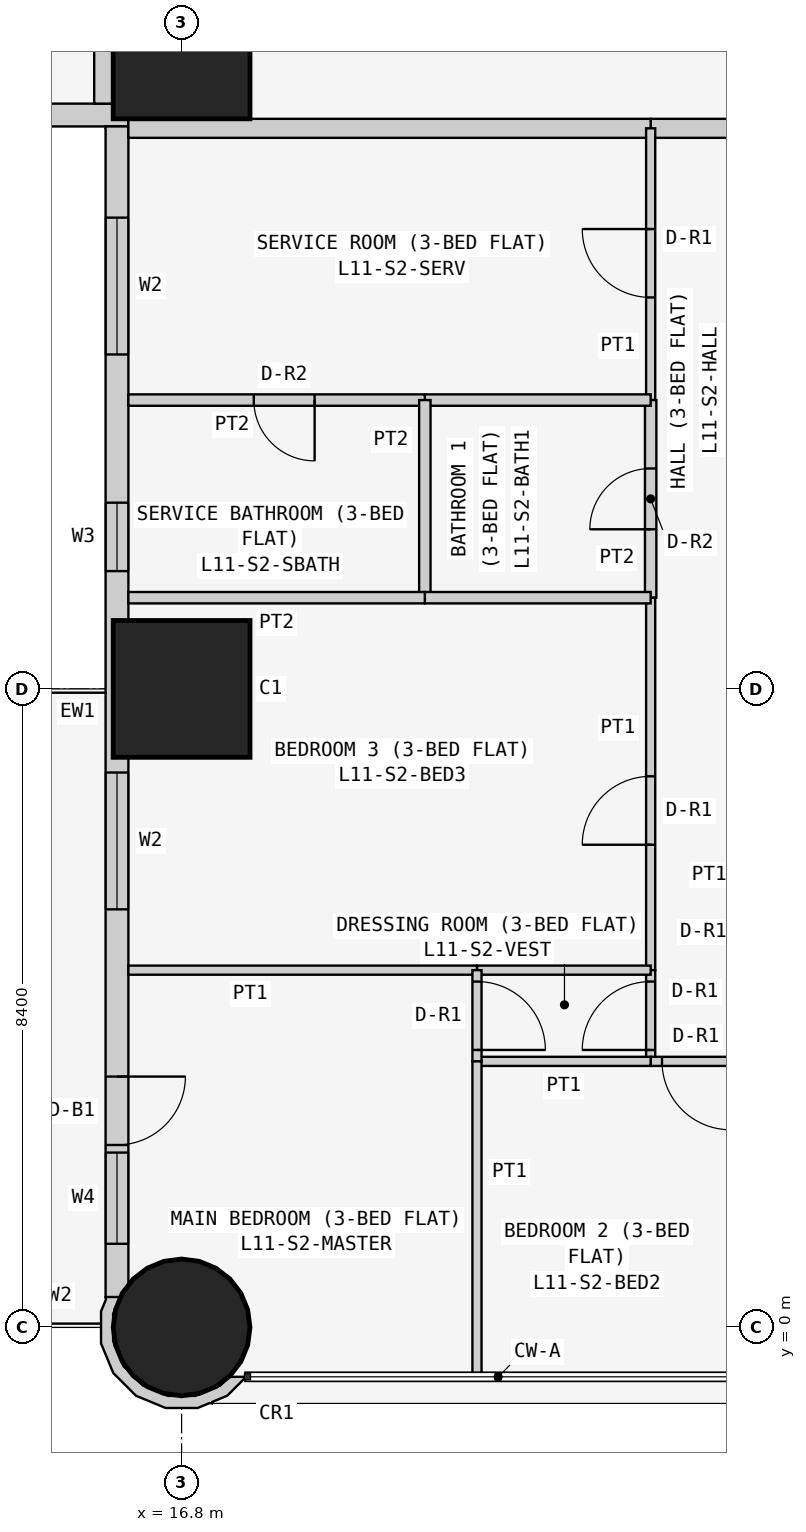
"""IFC4 building model, lengths in metres.
Left out: names, types, materials, properties, quantities, classifications, styles, units other than length and angle.
Written with IfcOpenShell. Run it as: python <this file> out.ifc"""

import sys

from ifc_helpers import new_model, si_unit, direction, frame, frame_2d, origin, origin_2d, place, context, subcontext, project, spatial, polyline, rectangle, circle, outline, extrude, element, fill, save


model = new_model("IFC4")
c1 = context("Model", 3, precision=1e-05, world=origin(), true_north=direction((0.0, 1.0)))
c2 = subcontext(c1, "Body", "Model", "MODEL_VIEW")
j1 = project(units=[si_unit("LENGTHUNIT", "METRE"), si_unit("PLANEANGLEUNIT", "RADIAN")], contexts=[c1])
p1 = place(None, origin())
s1 = spatial("IfcSite", under=j1, at=p1, CompositionType="ELEMENT")
p2 = place(p1, origin())
s2 = spatial("IfcBuilding", under=s1, at=p2, CompositionType="ELEMENT")
p3 = place(p2, frame((0.0, 0.0, 48.9)))
s3 = spatial("IfcBuildingStorey", under=s2, at=p3, CompositionType="ELEMENT", Elevation=48.9)
p4 = place(p3, frame((16.8, 0.0, 0.0), z_axis=(0.0, 0.0, 1.0), x_axis=(1.0, 0.0, 0.0)))
e1 = element("IfcColumn", 1, at=p4, inside=s3, PredefinedType="COLUMN", context=c2, shape_type="SweptSolid", body=[
    extrude(circle(Radius=0.9, at=origin_2d()), origin(), (0.0, 0.0, 1.0), 3.6),
])
for number, where, z_axis, x_axis in (
    (2, (16.8, 8.4, 0.0), (0.0, 0.0, 1.0), (1.0, 0.0, 0.0)),
    (3, (16.8, 16.8, 0.0), (0.0, 0.0, 1.0), (1.0, 0.0, 0.0)),
):
    element("IfcColumn", number, at=place(p3, frame(where, z_axis=z_axis, x_axis=x_axis)), inside=s3, PredefinedType="COLUMN", context=c2, shape_type="SweptSolid", body=[
        extrude(rectangle(XDim=1.8, YDim=1.8, at=origin_2d()), origin(), (0.0, 0.0, 1.0), 3.6),
    ])
p5 = place(p3, frame((0.4, 15.95, 0.0), z_axis=(0.0, 0.0, 1.0), x_axis=(1.0, 0.0, 0.0)))
e4 = element("IfcWall", 4, at=p5, inside=s3, PredefinedType="SOLIDWALL", context=c2, shape_type="SweptSolid", body=[
    extrude(rectangle(XDim=15.7, YDim=0.3, at=frame_2d((7.85, 0.0))), origin(), (0.0, 0.0, 1.0), 3.45),
])
p6 = place(p5, frame((12.4, 0.0, 0.9)))
e5 = element("IfcOpeningElement", 5, at=p6, cuts=e4, PredefinedType="OPENING", context=c2, shape_type="SweptSolid", body=[
    extrude(rectangle(XDim=1.8, YDim=1.5, at=frame_2d((0.9, 0.75))), frame((0.0, 0.16, 0.0), z_axis=(0.0, -1.0, 0.0), x_axis=(1.0, 0.0, 0.0)), (0.0, 0.0, 1.0), 0.32),
])
p7 = place(p5, frame((9.55, 0.0, 1.5)))
e6 = element("IfcOpeningElement", 6, at=p7, cuts=e4, PredefinedType="OPENING", context=c2, shape_type="SweptSolid", body=[
    extrude(rectangle(XDim=0.9, YDim=0.7, at=frame_2d((0.45, 0.35))), frame((0.0, 0.16, 0.0), z_axis=(0.0, -1.0, 0.0), x_axis=(1.0, 0.0, 0.0)), (0.0, 0.0, 1.0), 0.32),
])
p8 = place(p5, frame((5.1, 0.0, 0.9)))
e7 = element("IfcOpeningElement", 7, at=p8, cuts=e4, PredefinedType="OPENING", context=c2, shape_type="SweptSolid", body=[
    extrude(rectangle(XDim=1.8, YDim=1.5, at=frame_2d((0.9, 0.75))), frame((0.0, 0.16, 0.0), z_axis=(0.0, -1.0, 0.0), x_axis=(1.0, 0.0, 0.0)), (0.0, 0.0, 1.0), 0.32),
])
p9 = place(p5, frame((2.0, 0.0, 0.0)))
e8 = element("IfcOpeningElement", 8, at=p9, cuts=e4, PredefinedType="OPENING", context=c2, shape_type="SweptSolid", body=[
    extrude(rectangle(XDim=0.9, YDim=2.4, at=frame_2d((0.45, 1.2))), frame((0.0, 0.16, 0.0), z_axis=(0.0, -1.0, 0.0), x_axis=(1.0, 0.0, 0.0)), (0.0, 0.0, 1.0), 0.32),
])
p10 = place(p5, frame((0.7, 0.0, 0.9)))
e9 = element("IfcOpeningElement", 9, at=p10, cuts=e4, PredefinedType="OPENING", context=c2, shape_type="SweptSolid", body=[
    extrude(rectangle(XDim=1.2, YDim=1.5, at=frame_2d((0.6, 0.75))), frame((0.0, 0.16, 0.0), z_axis=(0.0, -1.0, 0.0), x_axis=(1.0, 0.0, 0.0)), (0.0, 0.0, 1.0), 0.32),
])
p11 = place(p3, frame((15.95, 15.8, 0.0), z_axis=(0.0, 0.0, 1.0), x_axis=(0.0, -1.0, 0.0)))
e10 = element("IfcWall", 10, at=p11, inside=s3, PredefinedType="SOLIDWALL", context=c2, shape_type="SweptSolid", body=[
    extrude(rectangle(XDim=15.4, YDim=0.3, at=frame_2d((7.7, 0.0))), origin(), (0.0, 0.0, 1.0), 3.45),
])
p12 = place(p11, frame((1.2, 0.0, 0.9)))
e11 = element("IfcOpeningElement", 11, at=p12, cuts=e10, PredefinedType="OPENING", context=c2, shape_type="SweptSolid", body=[
    extrude(rectangle(XDim=1.8, YDim=1.5, at=frame_2d((0.9, 0.75))), frame((0.0, 0.16, 0.0), z_axis=(0.0, -1.0, 0.0), x_axis=(1.0, 0.0, 0.0)), (0.0, 0.0, 1.0), 0.32),
])
p13 = place(p11, frame((4.95, 0.0, 1.5)))
e12 = element("IfcOpeningElement", 12, at=p13, cuts=e10, PredefinedType="OPENING", context=c2, shape_type="SweptSolid", body=[
    extrude(rectangle(XDim=0.9, YDim=0.7, at=frame_2d((0.45, 0.35))), frame((0.0, 0.16, 0.0), z_axis=(0.0, -1.0, 0.0), x_axis=(1.0, 0.0, 0.0)), (0.0, 0.0, 1.0), 0.32),
])
p14 = place(p11, frame((8.5, 0.0, 0.9)))
e13 = element("IfcOpeningElement", 13, at=p14, cuts=e10, PredefinedType="OPENING", context=c2, shape_type="SweptSolid", body=[
    extrude(rectangle(XDim=1.8, YDim=1.5, at=frame_2d((0.9, 0.75))), frame((0.0, 0.16, 0.0), z_axis=(0.0, -1.0, 0.0), x_axis=(1.0, 0.0, 0.0)), (0.0, 0.0, 1.0), 0.32),
])
p15 = place(p11, frame((12.5, 0.0, 0.0)))
e14 = element("IfcOpeningElement", 14, at=p15, cuts=e10, PredefinedType="OPENING", context=c2, shape_type="SweptSolid", body=[
    extrude(rectangle(XDim=0.9, YDim=2.4, at=frame_2d((0.45, 1.2))), frame((0.0, 0.16, 0.0), z_axis=(0.0, -1.0, 0.0), x_axis=(1.0, 0.0, 0.0)), (0.0, 0.0, 1.0), 0.32),
])
p16 = place(p11, frame((13.5, 0.0, 0.9)))
e15 = element("IfcOpeningElement", 15, at=p16, cuts=e10, PredefinedType="OPENING", context=c2, shape_type="SweptSolid", body=[
    extrude(rectangle(XDim=1.2, YDim=1.5, at=frame_2d((0.6, 0.75))), frame((0.0, 0.16, 0.0), z_axis=(0.0, -1.0, 0.0), x_axis=(1.0, 0.0, 0.0)), (0.0, 0.0, 1.0), 0.32),
])
p17 = place(p3, frame((15.89, 0.364, 0.0), z_axis=(0.0, 0.0, 1.0), x_axis=(-0.377204953059, -0.926129809145, 0.0)))
e16 = element("IfcWall", 16, at=p17, inside=s3, PredefinedType="SOLIDWALL", context=c2, shape_type="SweptSolid", body=[
    extrude(outline(polyline([(0.36, 1.803), (0.509, 1.741), (0.761, 1.486), (0.896, 1.154), (0.894, 0.795), (0.755, 0.465), (0.5, 0.213), (0.168, 0.078), (-0.1, 0.08), (0.001, -0.097), (0.03, -0.08), (0.199, -0.081), (0.589, 0.078), (0.889, 0.374), (1.053, 0.763), (1.055, 1.185), (0.896, 1.575), (0.778, 1.695), (0.769, 1.728), (0.75, 1.723), (0.6, 1.875), (0.295, 2.004), (0.281, 1.998), (0.36, 1.803)])), origin(), (0.0, 0.0, 1.0), 3.45),
])
p18 = place(p3, frame((24.171, 15.775, 0.0), z_axis=(0.0, 0.0, 1.0), x_axis=(-1.0, 0.0, 0.0)))
e17 = element("IfcWall", 17, at=p18, inside=s3, PredefinedType="PARTITIONING", context=c2, shape_type="SweptSolid", body=[
    extrude(rectangle(XDim=1.2, YDim=0.25, at=frame_2d((0.6, 0.0))), origin(), (0.0, 0.0, 1.0), 3.45),
])
for number, where, z_axis, x_axis in (
    (18, (22.971, 15.775, 0.0), (0.0, 0.0, 1.0), (-1.0, 0.0, 0.0)),
    (19, (15.775, 16.1, 0.0), (0.0, 0.0, 1.0), (0.0, 1.0, 0.0)),
):
    element("IfcWall", number, at=place(p3, frame(where, z_axis=z_axis, x_axis=x_axis)), inside=s3, PredefinedType="PARTITIONING", context=c2, shape_type="SweptSolid", body=[
        extrude(rectangle(XDim=6.871, YDim=0.25, at=frame_2d((3.436, 0.0))), origin(), (0.0, 0.0, 1.0), 3.45),
    ])
p19 = place(p3, frame((22.971, 12.2, 0.0), z_axis=(0.0, 0.0, 1.0), x_axis=(0.0, 1.0, 0.0)))
e20 = element("IfcWall", 20, at=p19, inside=s3, PredefinedType="PARTITIONING", context=c2, shape_type="SweptSolid", body=[
    extrude(rectangle(XDim=3.575, YDim=0.12, at=frame_2d((1.788, 0.0))), origin(), (0.0, 0.0, 1.0), 3.45),
])
p20 = place(p19, frame((1.35, 0.0, 0.0)))
e21 = element("IfcOpeningElement", 21, at=p20, cuts=e20, PredefinedType="OPENING", context=c2, shape_type="SweptSolid", body=[
    extrude(rectangle(XDim=0.9, YDim=2.1, at=frame_2d((0.45, 1.05))), frame((0.0, 0.07, 0.0), z_axis=(0.0, -1.0, 0.0), x_axis=(1.0, 0.0, 0.0)), (0.0, 0.0, 1.0), 0.14),
])
p21 = place(p3, frame((22.971, 9.6, 0.0), z_axis=(0.0, 0.0, 1.0), x_axis=(0.0, 1.0, 0.0)))
e22 = element("IfcWall", 22, at=p21, inside=s3, PredefinedType="PARTITIONING", context=c2, shape_type="SweptSolid", body=[
    extrude(rectangle(XDim=2.6, YDim=0.15, at=frame_2d((1.3, 0.0))), origin(), (0.0, 0.0, 1.0), 3.45),
])
p22 = place(p21, frame((0.9, 0.0, 0.0)))
e23 = element("IfcOpeningElement", 23, at=p22, cuts=e22, PredefinedType="OPENING", context=c2, shape_type="SweptSolid", body=[
    extrude(rectangle(XDim=0.8, YDim=2.1, at=frame_2d((0.4, 1.05))), frame((0.0, 0.085, 0.0), z_axis=(0.0, -1.0, 0.0), x_axis=(1.0, 0.0, 0.0)), (0.0, 0.0, 1.0), 0.17),
])
p23 = place(p3, frame((22.971, 4.7, 0.0), z_axis=(0.0, 0.0, 1.0), x_axis=(0.0, 1.0, 0.0)))
e24 = element("IfcWall", 24, at=p23, inside=s3, PredefinedType="PARTITIONING", context=c2, shape_type="SweptSolid", body=[
    extrude(rectangle(XDim=4.9, YDim=0.12, at=frame_2d((2.45, 0.0))), origin(), (0.0, 0.0, 1.0), 3.45),
])
p24 = place(p23, frame((1.65, 0.0, 0.0)))
e25 = element("IfcOpeningElement", 25, at=p24, cuts=e24, PredefinedType="OPENING", context=c2, shape_type="SweptSolid", body=[
    extrude(rectangle(XDim=0.9, YDim=2.1, at=frame_2d((0.45, 1.05))), frame((0.0, 0.07, 0.0), z_axis=(0.0, -1.0, 0.0), x_axis=(1.0, 0.0, 0.0)), (0.0, 0.0, 1.0), 0.14),
])
p25 = place(p3, frame((22.971, 3.5, 0.0), z_axis=(0.0, 0.0, 1.0), x_axis=(0.0, 1.0, 0.0)))
e26 = element("IfcWall", 26, at=p25, inside=s3, PredefinedType="PARTITIONING", context=c2, shape_type="SweptSolid", body=[
    extrude(rectangle(XDim=1.2, YDim=0.12, at=frame_2d((0.6, 0.0))), origin(), (0.0, 0.0, 1.0), 3.45),
])
p26 = place(p25, frame((0.15, 0.0, 0.0)))
e27 = element("IfcOpeningElement", 27, at=p26, cuts=e26, PredefinedType="OPENING", context=c2, shape_type="SweptSolid", body=[
    extrude(rectangle(XDim=0.9, YDim=2.1, at=frame_2d((0.45, 1.05))), frame((0.0, 0.07, 0.0), z_axis=(0.0, -1.0, 0.0), x_axis=(1.0, 0.0, 0.0)), (0.0, 0.0, 1.0), 0.14),
])
p27 = place(p3, frame((24.171, 3.5, 0.0), z_axis=(0.0, 0.0, 1.0), x_axis=(-1.0, 0.0, 0.0)))
e28 = element("IfcWall", 28, at=p27, inside=s3, PredefinedType="PARTITIONING", context=c2, shape_type="SweptSolid", body=[
    extrude(rectangle(XDim=1.2, YDim=0.12, at=frame_2d((0.6, 0.0))), origin(), (0.0, 0.0, 1.0), 3.45),
])
p28 = place(p27, frame((0.151, 0.0, 0.0)))
e29 = element("IfcOpeningElement", 29, at=p28, cuts=e28, PredefinedType="OPENING", context=c2, shape_type="SweptSolid", body=[
    extrude(rectangle(XDim=0.9, YDim=2.1, at=frame_2d((0.45, 1.05))), frame((0.0, 0.07, 0.0), z_axis=(0.0, -1.0, 0.0), x_axis=(1.0, 0.0, 0.0)), (0.0, 0.0, 1.0), 0.14),
])
p29 = place(p3, frame((22.971, 12.2, 0.0), z_axis=(0.0, 0.0, 1.0), x_axis=(-1.0, 0.0, 0.0)))
e30 = element("IfcWall", 30, at=p29, inside=s3, PredefinedType="PARTITIONING", context=c2, shape_type="SweptSolid", body=[
    extrude(rectangle(XDim=2.971, YDim=0.15, at=frame_2d((1.485, 0.0))), origin(), (0.0, 0.0, 1.0), 3.45),
])
p30 = place(p3, frame((20.0, 12.2, 0.0), z_axis=(0.0, 0.0, 1.0), x_axis=(-1.0, 0.0, 0.0)))
e31 = element("IfcWall", 31, at=p30, inside=s3, PredefinedType="PARTITIONING", context=c2, shape_type="SweptSolid", body=[
    extrude(rectangle(XDim=3.9, YDim=0.15, at=frame_2d((1.95, 0.0))), origin(), (0.0, 0.0, 1.0), 3.45),
])
p31 = place(p30, frame((1.45, 0.0, 0.0)))
e32 = element("IfcOpeningElement", 32, at=p31, cuts=e31, PredefinedType="OPENING", context=c2, shape_type="SweptSolid", body=[
    extrude(rectangle(XDim=0.8, YDim=2.1, at=frame_2d((0.4, 1.05))), frame((0.0, 0.085, 0.0), z_axis=(0.0, -1.0, 0.0), x_axis=(1.0, 0.0, 0.0)), (0.0, 0.0, 1.0), 0.17),
])
p32 = place(p3, frame((20.0, 9.6, 0.0), z_axis=(0.0, 0.0, 1.0), x_axis=(0.0, 1.0, 0.0)))
e33 = element("IfcWall", 33, at=p32, inside=s3, PredefinedType="PARTITIONING", context=c2, shape_type="SweptSolid", body=[
    extrude(rectangle(XDim=2.6, YDim=0.15, at=frame_2d((1.3, 0.0))), origin(), (0.0, 0.0, 1.0), 3.45),
])
p33 = place(p3, frame((22.971, 9.6, 0.0), z_axis=(0.0, 0.0, 1.0), x_axis=(-1.0, 0.0, 0.0)))
e34 = element("IfcWall", 34, at=p33, inside=s3, PredefinedType="PARTITIONING", context=c2, shape_type="SweptSolid", body=[
    extrude(rectangle(XDim=2.971, YDim=0.15, at=frame_2d((1.485, 0.0))), origin(), (0.0, 0.0, 1.0), 3.45),
])
p34 = place(p3, frame((20.0, 9.6, 0.0), z_axis=(0.0, 0.0, 1.0), x_axis=(-1.0, 0.0, 0.0)))
e35 = element("IfcWall", 35, at=p34, inside=s3, PredefinedType="PARTITIONING", context=c2, shape_type="SweptSolid", body=[
    extrude(rectangle(XDim=3.9, YDim=0.15, at=frame_2d((1.95, 0.0))), origin(), (0.0, 0.0, 1.0), 3.45),
])
p35 = place(p3, frame((22.971, 4.7, 0.0), z_axis=(0.0, 0.0, 1.0), x_axis=(-1.0, 0.0, 0.0)))
e36 = element("IfcWall", 36, at=p35, inside=s3, PredefinedType="PARTITIONING", context=c2, shape_type="SweptSolid", body=[
    extrude(rectangle(XDim=2.285, YDim=0.12, at=frame_2d((1.143, 0.0))), origin(), (0.0, 0.0, 1.0), 3.45),
])
p36 = place(p3, frame((20.686, 4.7, 0.0), z_axis=(0.0, 0.0, 1.0), x_axis=(-1.0, 0.0, 0.0)))
e37 = element("IfcWall", 37, at=p36, inside=s3, PredefinedType="PARTITIONING", context=c2, shape_type="SweptSolid", body=[
    extrude(rectangle(XDim=4.586, YDim=0.12, at=frame_2d((2.293, 0.0))), origin(), (0.0, 0.0, 1.0), 3.45),
])
p37 = place(p3, frame((22.971, 3.5, 0.0), z_axis=(0.0, 0.0, 1.0), x_axis=(-1.0, 0.0, 0.0)))
e38 = element("IfcWall", 38, at=p37, inside=s3, PredefinedType="PARTITIONING", context=c2, shape_type="SweptSolid", body=[
    extrude(rectangle(XDim=2.285, YDim=0.12, at=frame_2d((1.143, 0.0))), origin(), (0.0, 0.0, 1.0), 3.45),
])
p38 = place(p3, frame((20.686, 3.5, 0.0), z_axis=(0.0, 0.0, 1.0), x_axis=(0.0, 1.0, 0.0)))
e39 = element("IfcWall", 39, at=p38, inside=s3, PredefinedType="PARTITIONING", context=c2, shape_type="SweptSolid", body=[
    extrude(rectangle(XDim=1.2, YDim=0.12, at=frame_2d((0.6, 0.0))), origin(), (0.0, 0.0, 1.0), 3.45),
])
p39 = place(p38, frame((0.15, 0.0, 0.0)))
e40 = element("IfcOpeningElement", 40, at=p39, cuts=e39, PredefinedType="OPENING", context=c2, shape_type="SweptSolid", body=[
    extrude(rectangle(XDim=0.9, YDim=2.1, at=frame_2d((0.45, 1.05))), frame((0.0, 0.07, 0.0), z_axis=(0.0, -1.0, 0.0), x_axis=(1.0, 0.0, 0.0)), (0.0, 0.0, 1.0), 0.14),
])
p40 = place(p3, frame((20.686, -0.65, 0.0), z_axis=(0.0, 0.0, 1.0), x_axis=(0.0, 1.0, 0.0)))
e41 = element("IfcWall", 41, at=p40, inside=s3, PredefinedType="PARTITIONING", context=c2, shape_type="SweptSolid", body=[
    extrude(rectangle(XDim=4.15, YDim=0.12, at=frame_2d((2.075, 0.0))), origin(), (0.0, 0.0, 1.0), 3.45),
])
p41 = place(p12, origin())
e42 = element("IfcWindow", 42, at=p41, inside=s3, PartitioningType="SINGLE_PANEL", PredefinedType="WINDOW", context=c2, shape_type="SweptSolid", body=[
    extrude(rectangle(XDim=1.8, YDim=1.5, at=frame_2d((0.9, 0.75))), frame((0.0, 0.03, 0.0), z_axis=(0.0, -1.0, 0.0), x_axis=(1.0, 0.0, 0.0)), (0.0, 0.0, 1.0), 0.06),
])
fill(e11, e42)
p42 = place(p13, origin())
e43 = element("IfcWindow", 43, at=p42, inside=s3, PartitioningType="SINGLE_PANEL", PredefinedType="WINDOW", context=c2, shape_type="SweptSolid", body=[
    extrude(rectangle(XDim=0.9, YDim=0.7, at=frame_2d((0.45, 0.35))), frame((0.0, 0.03, 0.0), z_axis=(0.0, -1.0, 0.0), x_axis=(1.0, 0.0, 0.0)), (0.0, 0.0, 1.0), 0.06),
])
fill(e12, e43)
p43 = place(p14, origin())
e44 = element("IfcWindow", 44, at=p43, inside=s3, PartitioningType="SINGLE_PANEL", PredefinedType="WINDOW", context=c2, shape_type="SweptSolid", body=[
    extrude(rectangle(XDim=1.8, YDim=1.5, at=frame_2d((0.9, 0.75))), frame((0.0, 0.03, 0.0), z_axis=(0.0, -1.0, 0.0), x_axis=(1.0, 0.0, 0.0)), (0.0, 0.0, 1.0), 0.06),
])
fill(e13, e44)
p44 = place(p15, origin())
e45 = element("IfcDoor", 45, at=p44, inside=s3, OperationType="SINGLE_SWING_LEFT", PredefinedType="DOOR", context=c2, shape_type="SweptSolid", body=[
    extrude(rectangle(XDim=0.9, YDim=2.4, at=frame_2d((0.45, 1.2))), frame((0.0, 0.025, 0.0), z_axis=(0.0, -1.0, 0.0), x_axis=(1.0, 0.0, 0.0)), (0.0, 0.0, 1.0), 0.05),
])
fill(e14, e45)
p45 = place(p16, origin())
e46 = element("IfcWindow", 46, at=p45, inside=s3, PartitioningType="SINGLE_PANEL", PredefinedType="WINDOW", context=c2, shape_type="SweptSolid", body=[
    extrude(rectangle(XDim=1.2, YDim=1.5, at=frame_2d((0.6, 0.75))), frame((0.0, 0.03, 0.0), z_axis=(0.0, -1.0, 0.0), x_axis=(1.0, 0.0, 0.0)), (0.0, 0.0, 1.0), 0.06),
])
fill(e15, e46)
p46 = place(p20, origin())
e47 = element("IfcDoor", 47, at=p46, inside=s3, OperationType="SINGLE_SWING_RIGHT", PredefinedType="DOOR", context=c2, shape_type="SweptSolid", body=[
    extrude(rectangle(XDim=0.9, YDim=2.1, at=frame_2d((0.45, 1.05))), frame((0.0, 0.025, 0.0), z_axis=(0.0, -1.0, 0.0), x_axis=(1.0, 0.0, 0.0)), (0.0, 0.0, 1.0), 0.05),
])
fill(e21, e47)
p47 = place(p31, origin())
e48 = element("IfcDoor", 48, at=p47, inside=s3, OperationType="SINGLE_SWING_LEFT", PredefinedType="DOOR", context=c2, shape_type="SweptSolid", body=[
    extrude(rectangle(XDim=0.8, YDim=2.1, at=frame_2d((0.4, 1.05))), frame((0.0, 0.025, 0.0), z_axis=(0.0, -1.0, 0.0), x_axis=(1.0, 0.0, 0.0)), (0.0, 0.0, 1.0), 0.05),
])
fill(e32, e48)
p48 = place(p22, origin())
e49 = element("IfcDoor", 49, at=p48, inside=s3, OperationType="SINGLE_SWING_LEFT", PredefinedType="DOOR", context=c2, shape_type="SweptSolid", body=[
    extrude(rectangle(XDim=0.8, YDim=2.1, at=frame_2d((0.4, 1.05))), frame((0.0, 0.025, 0.0), z_axis=(0.0, -1.0, 0.0), x_axis=(1.0, 0.0, 0.0)), (0.0, 0.0, 1.0), 0.05),
])
fill(e23, e49)
p49 = place(p24, origin())
e50 = element("IfcDoor", 50, at=p49, inside=s3, OperationType="SINGLE_SWING_LEFT", PredefinedType="DOOR", context=c2, shape_type="SweptSolid", body=[
    extrude(rectangle(XDim=0.9, YDim=2.1, at=frame_2d((0.45, 1.05))), frame((0.0, 0.025, 0.0), z_axis=(0.0, -1.0, 0.0), x_axis=(1.0, 0.0, 0.0)), (0.0, 0.0, 1.0), 0.05),
])
fill(e25, e50)
p50 = place(p26, origin())
e51 = element("IfcDoor", 51, at=p50, inside=s3, OperationType="SINGLE_SWING_LEFT", PredefinedType="DOOR", context=c2, shape_type="SweptSolid", body=[
    extrude(rectangle(XDim=0.9, YDim=2.1, at=frame_2d((0.45, 1.05))), frame((0.0, 0.025, 0.0), z_axis=(0.0, -1.0, 0.0), x_axis=(1.0, 0.0, 0.0)), (0.0, 0.0, 1.0), 0.05),
])
fill(e27, e51)
p51 = place(p39, frame((0.9, 0.0, 0.0), z_axis=(0.0, 0.0, 1.0), x_axis=(-1.0, 0.0, 0.0)))
e52 = element("IfcDoor", 52, at=p51, inside=s3, OperationType="SINGLE_SWING_RIGHT", PredefinedType="DOOR", context=c2, shape_type="SweptSolid", body=[
    extrude(rectangle(XDim=0.9, YDim=2.1, at=frame_2d((0.45, 1.05))), frame((0.0, 0.025, 0.0), z_axis=(0.0, -1.0, 0.0), x_axis=(1.0, 0.0, 0.0)), (0.0, 0.0, 1.0), 0.05),
])
fill(e40, e52)
p52 = place(p28, origin())
e53 = element("IfcDoor", 53, at=p52, inside=s3, OperationType="SINGLE_SWING_LEFT", PredefinedType="DOOR", context=c2, shape_type="SweptSolid", body=[
    extrude(rectangle(XDim=0.9, YDim=2.1, at=frame_2d((0.45, 1.05))), frame((0.0, 0.025, 0.0), z_axis=(0.0, -1.0, 0.0), x_axis=(1.0, 0.0, 0.0)), (0.0, 0.0, 1.0), 0.05),
])
fill(e29, e53)
save(model, sys.argv[1])
